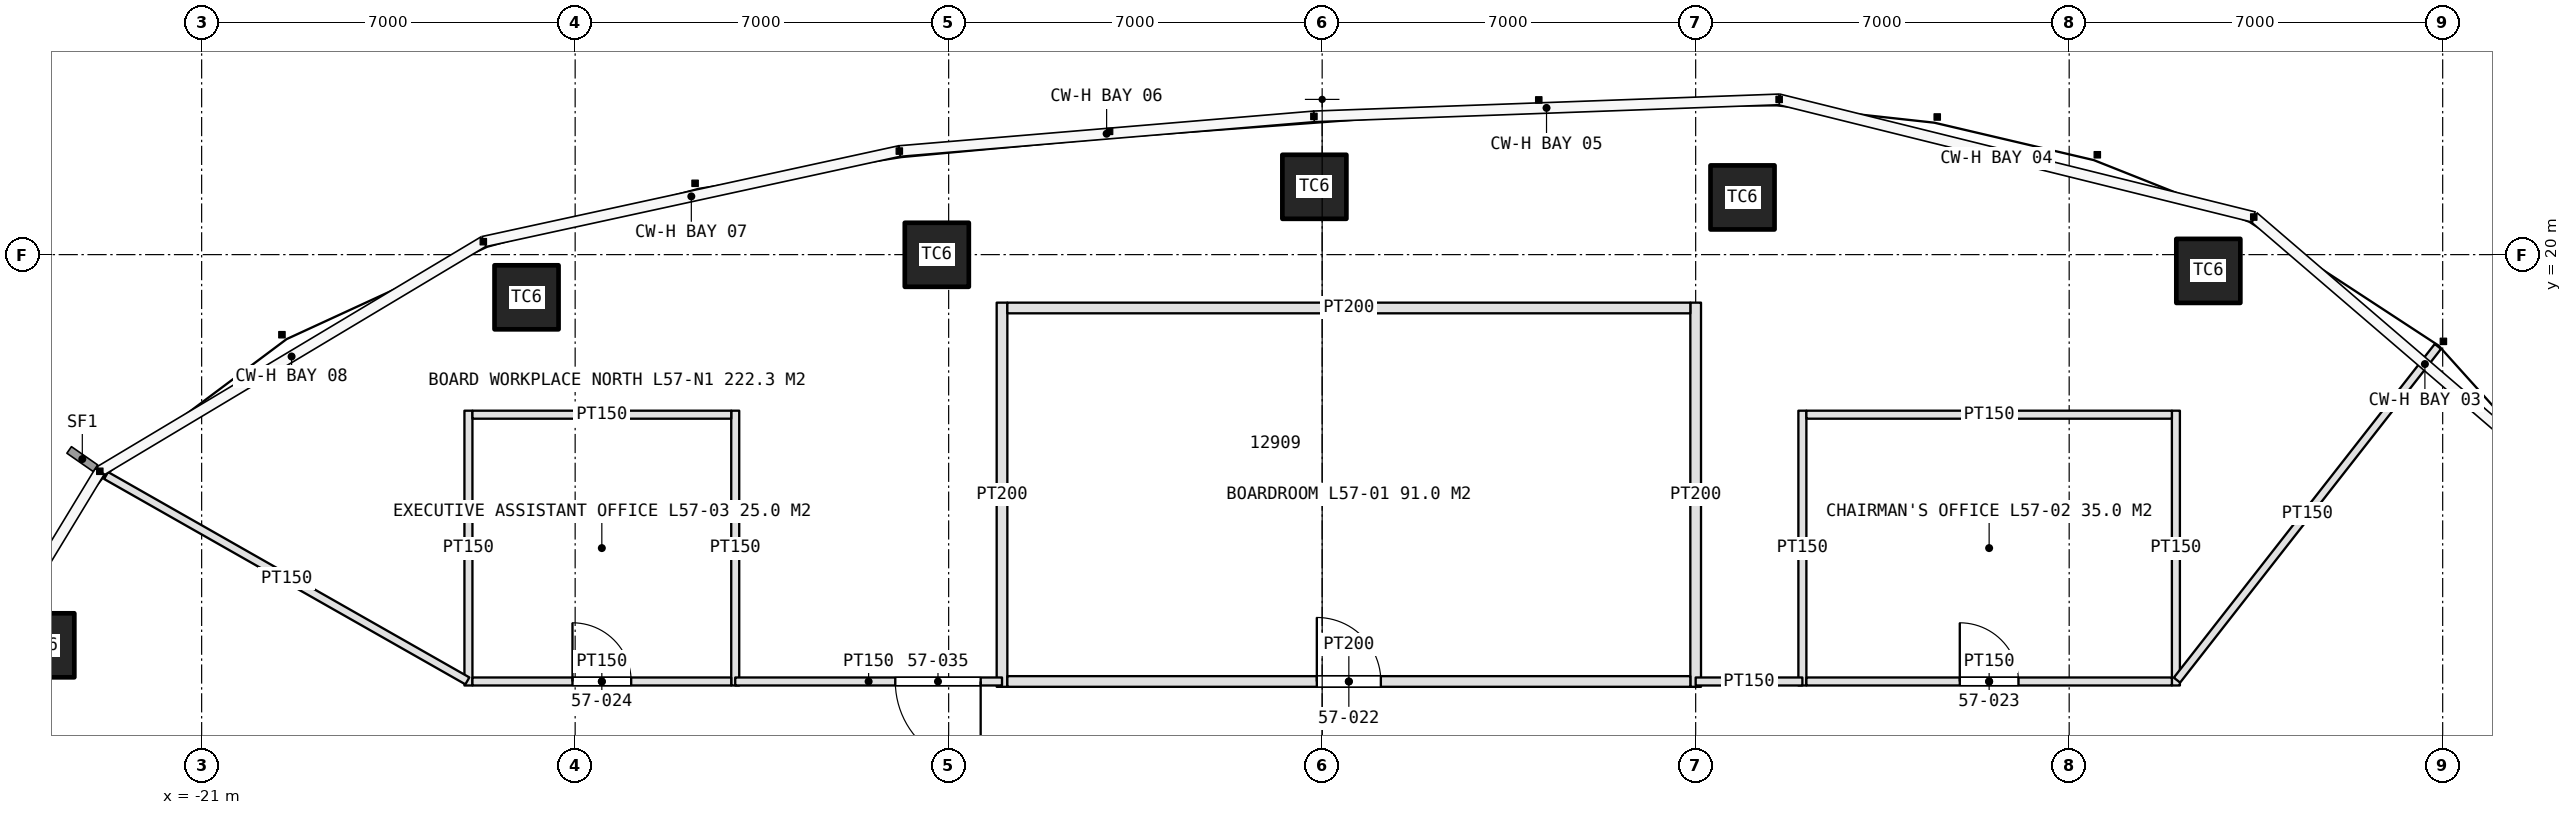
"""IFC4 building model, lengths in metres.
Left out: names, types, materials, properties, quantities, classifications, styles, units other than length and angle.
Written with IfcOpenShell. Run it as: python <this file> out.ifc"""

import sys

from ifc_helpers import new_model, si_unit, direction, frame, frame_2d, origin, origin_2d, place, context, subcontext, project, spatial, rectangle, extrude, element, fill, save


model = new_model("IFC4")
c1 = context("Model", 3, precision=1e-05, world=origin(), true_north=direction((0.0, 1.0)))
c2 = subcontext(c1, "Body", "Model", "MODEL_VIEW")
j1 = project(units=[si_unit("LENGTHUNIT", "METRE"), si_unit("PLANEANGLEUNIT", "RADIAN")], contexts=[c1])
p1 = place(None, origin())
s1 = spatial("IfcSite", under=j1, at=p1, CompositionType="ELEMENT")
p2 = place(p1, origin())
s2 = spatial("IfcBuilding", under=s1, at=p2, CompositionType="ELEMENT")
p3 = place(p2, frame((0.0, 0.0, 257.8)))
s3 = spatial("IfcBuildingStorey", under=s2, at=p3, CompositionType="ELEMENT", Elevation=257.8)
for number, where, z_axis, x_axis in (
    (1, (16.608, 19.695, 0.0), (0.0, 0.0, 1.0), (1.0, 0.0, 0.0)),
    (2, (7.878, 21.072, 0.0), (0.0, 0.0, 1.0), (1.0, 0.0, 0.0)),
    (3, (-0.146, 21.271, 0.0), (0.0, 0.0, 1.0), (1.0, 0.0, 0.0)),
    (4, (-7.222, 19.997, 0.0), (0.0, 0.0, 1.0), (1.0, 0.0, 0.0)),
    (5, (-14.911, 19.2, 0.0), (0.0, 0.0, 1.0), (1.0, 0.0, 0.0)),
    (6, (-23.986, 12.678, 0.0), (0.0, 0.0, 1.0), (1.0, 0.0, 0.0)),
):
    element("IfcColumn", number, at=place(p3, frame(where, z_axis=z_axis, x_axis=x_axis)), inside=s3, PredefinedType="COLUMN", context=c2, shape_type="SweptSolid", body=[
        extrude(rectangle(XDim=1.2, YDim=1.2, at=origin_2d()), origin(), (0.0, 0.0, 1.0), 4.2),
    ])
for number, where, z_axis, x_axis in (
    (7, (-6.0, 11.9, 0.0), (0.0, 0.0, 1.0), (0.0, 1.0, 0.0)),
    (8, (7.0, 11.9, 0.0), (0.0, 0.0, 1.0), (0.0, 1.0, 0.0)),
):
    element("IfcWall", number, at=place(p3, frame(where, z_axis=z_axis, x_axis=x_axis)), inside=s3, PredefinedType="PARTITIONING", context=c2, shape_type="SweptSolid", body=[
        extrude(rectangle(XDim=7.2, YDim=0.2, at=frame_2d((3.6, 0.0))), origin(), (0.0, 0.0, 1.0), 3.0),
    ])
p4 = place(p3, frame((-5.9, 12.0, 0.0), z_axis=(0.0, 0.0, 1.0), x_axis=(1.0, 0.0, 0.0)))
e9 = element("IfcWall", 9, at=p4, inside=s3, PredefinedType="PARTITIONING", context=c2, shape_type="SweptSolid", body=[
    extrude(rectangle(XDim=12.8, YDim=0.2, at=frame_2d((6.4, 0.0))), origin(), (0.0, 0.0, 1.0), 3.0),
])
p5 = place(p4, frame((5.8, 0.0, 0.0)))
e10 = element("IfcOpeningElement", 10, at=p5, cuts=e9, PredefinedType="OPENING", context=c2, shape_type="SweptSolid", body=[
    extrude(rectangle(XDim=1.2, YDim=2.4, at=frame_2d((0.6, 1.2))), frame((0.0, 0.11, 0.0), z_axis=(0.0, -1.0, 0.0), x_axis=(1.0, 0.0, 0.0)), (0.0, 0.0, 1.0), 0.22),
])
p6 = place(p3, frame((-5.9, 19.0, 0.0), z_axis=(0.0, 0.0, 1.0), x_axis=(1.0, 0.0, 0.0)))
e11 = element("IfcWall", 11, at=p6, inside=s3, PredefinedType="PARTITIONING", context=c2, shape_type="SweptSolid", body=[
    extrude(rectangle(XDim=12.8, YDim=0.2, at=frame_2d((6.4, 0.0))), origin(), (0.0, 0.0, 1.0), 3.0),
])
for number, where, z_axis, x_axis in (
    (12, (9.0, 11.925, 0.0), (0.0, 0.0, 1.0), (0.0, 1.0, 0.0)),
    (13, (16.0, 11.925, 0.0), (0.0, 0.0, 1.0), (0.0, 1.0, 0.0)),
):
    element("IfcWall", number, at=place(p3, frame(where, z_axis=z_axis, x_axis=x_axis)), inside=s3, PredefinedType="PARTITIONING", context=c2, shape_type="SweptSolid", body=[
        extrude(rectangle(XDim=5.15, YDim=0.15, at=frame_2d((2.575, 0.0))), origin(), (0.0, 0.0, 1.0), 3.0),
    ])
p7 = place(p3, frame((9.075, 12.0, 0.0), z_axis=(0.0, 0.0, 1.0), x_axis=(1.0, 0.0, 0.0)))
e14 = element("IfcWall", 14, at=p7, inside=s3, PredefinedType="PARTITIONING", context=c2, shape_type="SweptSolid", body=[
    extrude(rectangle(XDim=6.85, YDim=0.15, at=frame_2d((3.425, 0.0))), origin(), (0.0, 0.0, 1.0), 3.0),
])
p8 = place(p7, frame((2.875, 0.0, 0.0)))
e15 = element("IfcOpeningElement", 15, at=p8, cuts=e14, PredefinedType="OPENING", context=c2, shape_type="SweptSolid", body=[
    extrude(rectangle(XDim=1.1, YDim=2.3, at=frame_2d((0.55, 1.15))), frame((0.0, 0.085, 0.0), z_axis=(0.0, -1.0, 0.0), x_axis=(1.0, 0.0, 0.0)), (0.0, 0.0, 1.0), 0.17),
])
p9 = place(p3, frame((9.075, 17.0, 0.0), z_axis=(0.0, 0.0, 1.0), x_axis=(1.0, 0.0, 0.0)))
e16 = element("IfcWall", 16, at=p9, inside=s3, PredefinedType="PARTITIONING", context=c2, shape_type="SweptSolid", body=[
    extrude(rectangle(XDim=6.85, YDim=0.15, at=frame_2d((3.425, 0.0))), origin(), (0.0, 0.0, 1.0), 3.0),
])
for number, where, z_axis, x_axis in (
    (17, (-16.0, 11.925, 0.0), (0.0, 0.0, 1.0), (0.0, 1.0, 0.0)),
    (18, (-11.0, 11.925, 0.0), (0.0, 0.0, 1.0), (0.0, 1.0, 0.0)),
):
    element("IfcWall", number, at=place(p3, frame(where, z_axis=z_axis, x_axis=x_axis)), inside=s3, PredefinedType="PARTITIONING", context=c2, shape_type="SweptSolid", body=[
        extrude(rectangle(XDim=5.15, YDim=0.15, at=frame_2d((2.575, 0.0))), origin(), (0.0, 0.0, 1.0), 3.0),
    ])
p10 = place(p3, frame((-15.925, 12.0, 0.0), z_axis=(0.0, 0.0, 1.0), x_axis=(1.0, 0.0, 0.0)))
e19 = element("IfcWall", 19, at=p10, inside=s3, PredefinedType="PARTITIONING", context=c2, shape_type="SweptSolid", body=[
    extrude(rectangle(XDim=4.85, YDim=0.15, at=frame_2d((2.425, 0.0))), origin(), (0.0, 0.0, 1.0), 3.0),
])
p11 = place(p10, frame((1.875, 0.0, 0.0)))
e20 = element("IfcOpeningElement", 20, at=p11, cuts=e19, PredefinedType="OPENING", context=c2, shape_type="SweptSolid", body=[
    extrude(rectangle(XDim=1.1, YDim=2.3, at=frame_2d((0.55, 1.15))), frame((0.0, 0.085, 0.0), z_axis=(0.0, -1.0, 0.0), x_axis=(1.0, 0.0, 0.0)), (0.0, 0.0, 1.0), 0.17),
])
p12 = place(p3, frame((-15.925, 17.0, 0.0), z_axis=(0.0, 0.0, 1.0), x_axis=(1.0, 0.0, 0.0)))
e21 = element("IfcWall", 21, at=p12, inside=s3, PredefinedType="PARTITIONING", context=c2, shape_type="SweptSolid", body=[
    extrude(rectangle(XDim=4.85, YDim=0.15, at=frame_2d((2.425, 0.0))), origin(), (0.0, 0.0, 1.0), 3.0),
])
p13 = place(p3, frame((-16.02, 12.011, 0.0), z_axis=(0.0, 0.0, 1.0), x_axis=(-0.869354026591, 0.494189818238, 0.0)))
e22 = element("IfcWall", 22, at=p13, inside=s3, PredefinedType="PARTITIONING", context=c2, shape_type="SweptSolid", body=[
    extrude(rectangle(XDim=7.788, YDim=0.15, at=frame_2d((3.894, 0.0))), origin(), (0.0, 0.0, 1.0), 3.0),
])
p14 = place(p3, frame((16.02, 12.026, 0.0), z_axis=(0.0, 0.0, 1.0), x_axis=(0.616031272047, 0.787721696959, 0.0)))
e23 = element("IfcWall", 23, at=p14, inside=s3, PredefinedType="PARTITIONING", context=c2, shape_type="SweptSolid", body=[
    extrude(rectangle(XDim=7.939, YDim=0.15, at=frame_2d((3.969, 0.0))), origin(), (0.0, 0.0, 1.0), 3.0),
])
p15 = place(p3, frame((-6.0, 12.0, 0.0), z_axis=(0.0, 0.0, 1.0), x_axis=(-1.0, 0.0, 0.0)))
e24 = element("IfcWall", 24, at=p15, inside=s3, PredefinedType="PARTITIONING", context=c2, shape_type="SweptSolid", body=[
    extrude(rectangle(XDim=5.0, YDim=0.15, at=frame_2d((2.5, 0.0))), origin(), (0.0, 0.0, 1.0), 3.0),
])
p16 = place(p15, frame((0.4, 0.0, 0.0)))
e25 = element("IfcOpeningElement", 25, at=p16, cuts=e24, PredefinedType="OPENING", context=c2, shape_type="SweptSolid", body=[
    extrude(rectangle(XDim=1.6, YDim=2.4, at=frame_2d((0.8, 1.2))), frame((0.0, 0.085, 0.0), z_axis=(0.0, -1.0, 0.0), x_axis=(1.0, 0.0, 0.0)), (0.0, 0.0, 1.0), 0.17),
])
p17 = place(p3, frame((9.0, 12.0, 0.0), z_axis=(0.0, 0.0, 1.0), x_axis=(-1.0, 0.0, 0.0)))
e26 = element("IfcWall", 26, at=p17, inside=s3, PredefinedType="PARTITIONING", context=c2, shape_type="SweptSolid", body=[
    extrude(rectangle(XDim=2.0, YDim=0.15, at=frame_2d((1.0, 0.0))), origin(), (0.0, 0.0, 1.0), 3.0),
])
p18 = place(p5, origin())
e27 = element("IfcDoor", 27, at=p18, inside=s3, OperationType="SINGLE_SWING_LEFT", PredefinedType="DOOR", context=c2, shape_type="SweptSolid", body=[
    extrude(rectangle(XDim=1.2, YDim=2.4, at=frame_2d((0.6, 1.2))), frame((0.0, 0.025, 0.0), z_axis=(0.0, -1.0, 0.0), x_axis=(1.0, 0.0, 0.0)), (0.0, 0.0, 1.0), 0.05),
])
fill(e10, e27)
p19 = place(p8, origin())
e28 = element("IfcDoor", 28, at=p19, inside=s3, OperationType="SINGLE_SWING_LEFT", PredefinedType="DOOR", context=c2, shape_type="SweptSolid", body=[
    extrude(rectangle(XDim=1.1, YDim=2.3, at=frame_2d((0.55, 1.15))), frame((0.0, 0.025, 0.0), z_axis=(0.0, -1.0, 0.0), x_axis=(1.0, 0.0, 0.0)), (0.0, 0.0, 1.0), 0.05),
])
fill(e15, e28)
p20 = place(p11, origin())
e29 = element("IfcDoor", 29, at=p20, inside=s3, OperationType="SINGLE_SWING_LEFT", PredefinedType="DOOR", context=c2, shape_type="SweptSolid", body=[
    extrude(rectangle(XDim=1.1, YDim=2.3, at=frame_2d((0.55, 1.15))), frame((0.0, 0.025, 0.0), z_axis=(0.0, -1.0, 0.0), x_axis=(1.0, 0.0, 0.0)), (0.0, 0.0, 1.0), 0.05),
])
fill(e20, e29)
p21 = place(p16, origin())
e30 = element("IfcDoor", 30, at=p21, inside=s3, OperationType="DOUBLE_DOOR_SINGLE_SWING", PredefinedType="DOOR", context=c2, shape_type="SweptSolid", body=[
    extrude(rectangle(XDim=1.6, YDim=2.4, at=frame_2d((0.8, 1.2))), frame((0.0, 0.025, 0.0), z_axis=(0.0, -1.0, 0.0), x_axis=(1.0, 0.0, 0.0)), (0.0, 0.0, 1.0), 0.05),
])
fill(e25, e30)
save(model, sys.argv[1])
